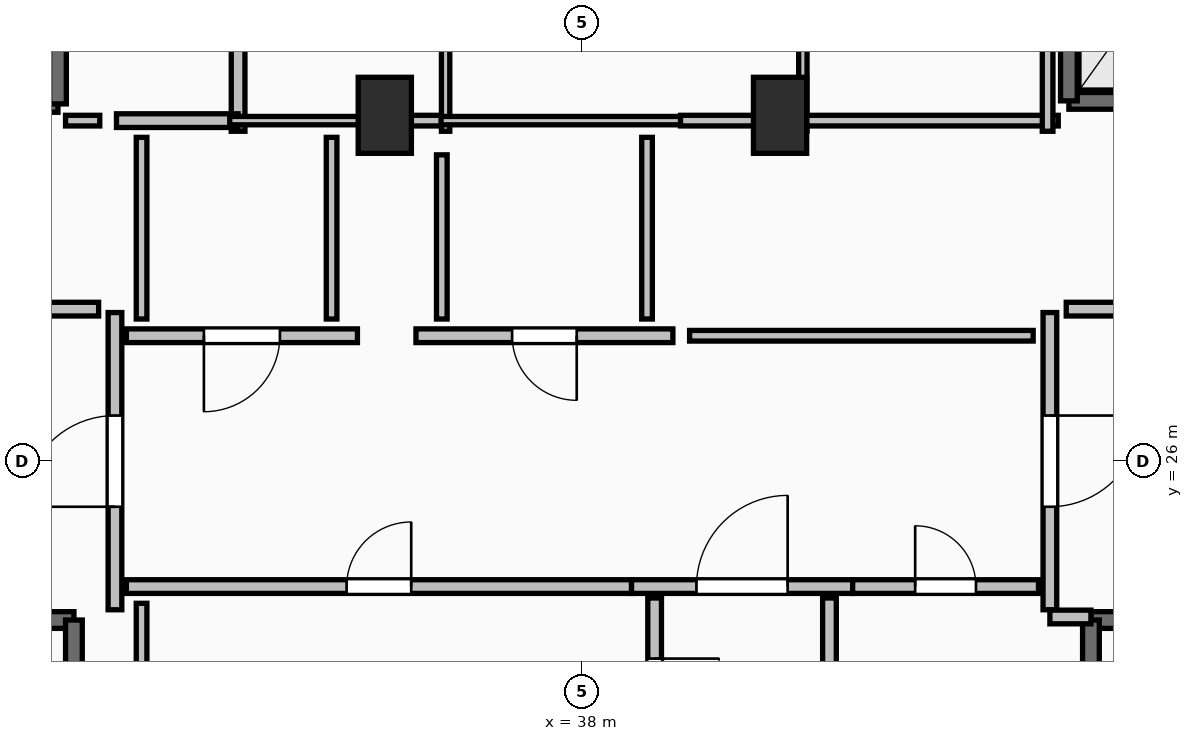
"""IFC4 building model, lengths in metres.
Left out: names, types, materials, properties, quantities, classifications, styles, units other than length and angle.
Written with IfcOpenShell. Run it as: python <this file> out.ifc"""

import sys

from ifc_helpers import new_model, si_unit, direction, frame, frame_2d, origin, origin_2d, place, context, subcontext, project, spatial, rectangle, extrude, element, fill, save


model = new_model("IFC4")
c1 = context("Model", 3, precision=1e-05, world=origin(), true_north=direction((0.0, 1.0)))
c2 = subcontext(c1, "Body", "Model", "MODEL_VIEW")
j1 = project(units=[si_unit("LENGTHUNIT", "METRE"), si_unit("PLANEANGLEUNIT", "RADIAN")], contexts=[c1])
p1 = place(None, origin())
s1 = spatial("IfcSite", under=j1, at=p1, CompositionType="ELEMENT")
p2 = place(p1, origin())
s2 = spatial("IfcBuilding", under=s1, at=p2, CompositionType="ELEMENT")
p3 = place(p2, frame((0.0, 0.0, 290.4)))
s3 = spatial("IfcBuildingStorey", under=s2, at=p3, CompositionType="ELEMENT", Elevation=290.4)
for number, where, z_axis, x_axis in (
    (1, (35.4, 30.55, 0.0), (0.0, 0.0, 1.0), (1.0, 0.0, 0.0)),
    (2, (40.6, 30.55, 0.0), (0.0, 0.0, 1.0), (1.0, 0.0, 0.0)),
):
    element("IfcColumn", number, at=place(p3, frame(where, z_axis=z_axis, x_axis=x_axis)), inside=s3, PredefinedType="PILASTER", context=c2, shape_type="SweptSolid", body=[
        extrude(rectangle(XDim=0.7, YDim=1.0, at=origin_2d()), origin(), (0.0, 0.0, 1.0), 5.0),
    ])
p4 = place(p3, frame((27.94, 23.91, 0.0), z_axis=(0.0, 0.0, 1.0), x_axis=(1.0, 0.0, 0.0)))
e3 = element("IfcWall", 3, at=p4, inside=s3, PredefinedType="SOLIDWALL", context=c2, shape_type="SweptSolid", body=[
    extrude(rectangle(XDim=3.37, YDim=0.22, at=frame_2d((1.685, 0.0))), origin(), (0.0, 0.0, 1.0), 4.72),
])
p5 = place(p4, frame((1.135, 0.0, 0.0)))
e4 = element("IfcOpeningElement", 4, at=p5, cuts=e3, PredefinedType="OPENING", context=c2, shape_type="SweptSolid", body=[
    extrude(rectangle(XDim=1.1, YDim=2.15, at=frame_2d((0.55, 1.075))), frame((0.0, 0.125, 0.0), z_axis=(0.0, -1.0, 0.0), x_axis=(1.0, 0.0, 0.0)), (0.0, 0.0, 1.0), 0.25),
])
p6 = place(p3, frame((31.31, 23.91, 0.0), z_axis=(0.0, 0.0, 1.0), x_axis=(0.0, -1.0, 0.0)))
e5 = element("IfcWall", 5, at=p6, inside=s3, PredefinedType="SOLIDWALL", context=c2, shape_type="SweptSolid", body=[
    extrude(rectangle(XDim=7.42, YDim=0.22, at=frame_2d((3.71, 0.0))), origin(), (0.0, 0.0, 1.0), 4.72),
])
p7 = place(p3, frame((44.69, 23.91, 0.0), z_axis=(0.0, 0.0, 1.0), x_axis=(1.0, 0.0, 0.0)))
e6 = element("IfcWall", 6, at=p7, inside=s3, PredefinedType="SOLIDWALL", context=c2, shape_type="SweptSolid", body=[
    extrude(rectangle(XDim=3.37, YDim=0.22, at=frame_2d((1.685, 0.0))), origin(), (0.0, 0.0, 1.0), 4.72),
])
p8 = place(p7, frame((1.135, 0.0, 0.0)))
e7 = element("IfcOpeningElement", 7, at=p8, cuts=e6, PredefinedType="OPENING", context=c2, shape_type="SweptSolid", body=[
    extrude(rectangle(XDim=1.1, YDim=2.15, at=frame_2d((0.55, 1.075))), frame((0.0, 0.125, 0.0), z_axis=(0.0, -1.0, 0.0), x_axis=(1.0, 0.0, 0.0)), (0.0, 0.0, 1.0), 0.25),
])
p9 = place(p3, frame((44.69, 16.49, 0.0), z_axis=(0.0, 0.0, 1.0), x_axis=(0.0, 1.0, 0.0)))
e8 = element("IfcWall", 8, at=p9, inside=s3, PredefinedType="SOLIDWALL", context=c2, shape_type="SweptSolid", body=[
    extrude(rectangle(XDim=7.42, YDim=0.22, at=frame_2d((3.71, 0.0))), origin(), (0.0, 0.0, 1.0), 4.72),
])
p10 = place(p3, frame((44.4, 30.74, 0.0), z_axis=(0.0, 0.0, 1.0), x_axis=(1.0, 0.0, 0.0)))
e9 = element("IfcWall", 9, at=p10, inside=s3, PredefinedType="SOLIDWALL", context=c2, shape_type="SweptSolid", body=[
    extrude(rectangle(XDim=1.8, YDim=0.22, at=frame_2d((0.9, 0.0))), origin(), (0.0, 0.0, 1.0), 4.72),
])
p11 = place(p3, frame((44.4, 33.16, 0.0), z_axis=(0.0, 0.0, 1.0), x_axis=(0.0, -1.0, 0.0)))
e10 = element("IfcWall", 10, at=p11, inside=s3, PredefinedType="SOLIDWALL", context=c2, shape_type="SweptSolid", body=[
    extrude(rectangle(XDim=2.42, YDim=0.22, at=frame_2d((1.21, 0.0))), origin(), (0.0, 0.0, 1.0), 4.72),
])
p12 = place(p3, frame((28.1, 30.7, 0.0), z_axis=(0.0, 0.0, 1.0), x_axis=(1.0, 0.0, 0.0)))
e11 = element("IfcWall", 11, at=p12, inside=s3, PredefinedType="SOLIDWALL", context=c2, shape_type="SweptSolid", body=[
    extrude(rectangle(XDim=3.0, YDim=0.22, at=frame_2d((1.5, 0.0))), origin(), (0.0, 0.0, 1.0), 4.72),
])
p13 = place(p3, frame((31.1, 30.7, 0.0), z_axis=(0.0, 0.0, 1.0), x_axis=(0.0, 1.0, 0.0)))
e12 = element("IfcWall", 12, at=p13, inside=s3, PredefinedType="SOLIDWALL", context=c2, shape_type="SweptSolid", body=[
    extrude(rectangle(XDim=2.5, YDim=0.22, at=frame_2d((1.25, 0.0))), origin(), (0.0, 0.0, 1.0), 4.72),
])
p14 = place(p3, frame((31.85, 24.045, 0.0), z_axis=(0.0, 0.0, 1.0), x_axis=(0.0, 1.0, 0.0)))
e13 = element("IfcWall", 13, at=p14, inside=s3, PredefinedType="PARTITIONING", context=c2, shape_type="SweptSolid", body=[
    extrude(rectangle(XDim=3.91, YDim=0.18, at=frame_2d((1.955, 0.0))), origin(), (0.0, 0.0, 1.0), 4.72),
])
p15 = place(p14, frame((1.355, 0.0, 0.0)))
e14 = element("IfcOpeningElement", 14, at=p15, cuts=e13, PredefinedType="OPENING", context=c2, shape_type="SweptSolid", body=[
    extrude(rectangle(XDim=1.2, YDim=2.15, at=frame_2d((0.6, 1.075))), frame((0.0, 0.105, 0.0), z_axis=(0.0, -1.0, 0.0), x_axis=(1.0, 0.0, 0.0)), (0.0, 0.0, 1.0), 0.21),
])
p16 = place(p3, frame((44.15, 27.955, 0.0), z_axis=(0.0, 0.0, 1.0), x_axis=(0.0, -1.0, 0.0)))
e15 = element("IfcWall", 15, at=p16, inside=s3, PredefinedType="PARTITIONING", context=c2, shape_type="SweptSolid", body=[
    extrude(rectangle(XDim=3.91, YDim=0.18, at=frame_2d((1.955, 0.0))), origin(), (0.0, 0.0, 1.0), 4.72),
])
p17 = place(p16, frame((1.355, 0.0, 0.0)))
e16 = element("IfcOpeningElement", 16, at=p17, cuts=e15, PredefinedType="OPENING", context=c2, shape_type="SweptSolid", body=[
    extrude(rectangle(XDim=1.2, YDim=2.15, at=frame_2d((0.6, 1.075))), frame((0.0, 0.105, 0.0), z_axis=(0.0, -1.0, 0.0), x_axis=(1.0, 0.0, 0.0)), (0.0, 0.0, 1.0), 0.21),
])
p18 = place(p3, frame((44.15, 23.95, 0.0), z_axis=(0.0, 0.0, 1.0), x_axis=(1.0, 0.0, 0.0)))
e17 = element("IfcWall", 17, at=p18, inside=s3, PredefinedType="PARTITIONING", context=c2, shape_type="SweptSolid", body=[
    extrude(rectangle(XDim=0.54, YDim=0.18, at=frame_2d((0.27, 0.0))), origin(), (0.0, 0.0, 1.0), 4.72),
])
p19 = place(p3, frame((33.47, 30.34, 0.0), z_axis=(0.0, 0.0, 1.0), x_axis=(0.0, 1.0, 0.0)))
e18 = element("IfcWall", 18, at=p19, inside=s3, PredefinedType="PARTITIONING", context=c2, shape_type="SweptSolid", body=[
    extrude(rectangle(XDim=3.56, YDim=0.18, at=frame_2d((1.78, 0.0))), origin(), (0.0, 0.0, 1.0), 4.72),
])
p20 = place(p3, frame((31.87, 30.48, 0.0), z_axis=(0.0, 0.0, 1.0), x_axis=(1.0, 0.0, 0.0)))
e19 = element("IfcWall", 19, at=p20, inside=s3, PredefinedType="PARTITIONING", context=c2, shape_type="SweptSolid", body=[
    extrude(rectangle(XDim=1.6, YDim=0.18, at=frame_2d((0.8, 0.0))), origin(), (0.0, 0.0, 1.0), 4.72),
])
p21 = place(p3, frame((38.645, 24.35, 0.0), z_axis=(0.0, 0.0, 1.0), x_axis=(1.0, 0.0, 0.0)))
e20 = element("IfcWall", 20, at=p21, inside=s3, PredefinedType="PARTITIONING", context=c2, shape_type="SweptSolid", body=[
    extrude(rectangle(XDim=2.91, YDim=0.18, at=frame_2d((1.455, 0.0))), origin(), (0.0, 0.0, 1.0), 4.72),
])
p22 = place(p21, frame((0.855, 0.0, 0.0)))
e21 = element("IfcOpeningElement", 21, at=p22, cuts=e20, PredefinedType="OPENING", context=c2, shape_type="SweptSolid", body=[
    extrude(rectangle(XDim=1.2, YDim=2.15, at=frame_2d((0.6, 1.075))), frame((0.0, 0.105, 0.0), z_axis=(0.0, -1.0, 0.0), x_axis=(1.0, 0.0, 0.0)), (0.0, 0.0, 1.0), 0.21),
])
p23 = place(p3, frame((41.555, 24.35, 0.0), z_axis=(0.0, 0.0, 1.0), x_axis=(1.0, 0.0, 0.0)))
e22 = element("IfcWall", 22, at=p23, inside=s3, PredefinedType="PARTITIONING", context=c2, shape_type="SweptSolid", body=[
    extrude(rectangle(XDim=2.445, YDim=0.18, at=frame_2d((1.223, 0.0))), origin(), (0.0, 0.0, 1.0), 4.72),
])
p24 = place(p23, frame((0.823, 0.0, 0.0)))
e23 = element("IfcOpeningElement", 23, at=p24, cuts=e22, PredefinedType="OPENING", context=c2, shape_type="SweptSolid", body=[
    extrude(rectangle(XDim=0.8, YDim=2.05, at=frame_2d((0.4, 1.025))), frame((0.0, 0.105, 0.0), z_axis=(0.0, -1.0, 0.0), x_axis=(1.0, 0.0, 0.0)), (0.0, 0.0, 1.0), 0.21),
])
p25 = place(p3, frame((35.04, 27.65, 0.0), z_axis=(0.0, 0.0, 1.0), x_axis=(-1.0, 0.0, 0.0)))
e24 = element("IfcWall", 24, at=p25, inside=s3, PredefinedType="PARTITIONING", context=c2, shape_type="SweptSolid", body=[
    extrude(rectangle(XDim=3.04, YDim=0.18, at=frame_2d((1.52, 0.0))), origin(), (0.0, 0.0, 1.0), 4.72),
])
p26 = place(p25, frame((1.02, 0.0, 0.0)))
e25 = element("IfcOpeningElement", 25, at=p26, cuts=e24, PredefinedType="OPENING", context=c2, shape_type="SweptSolid", body=[
    extrude(rectangle(XDim=1.0, YDim=2.15, at=frame_2d((0.5, 1.075))), frame((0.0, 0.105, 0.0), z_axis=(0.0, -1.0, 0.0), x_axis=(1.0, 0.0, 0.0)), (0.0, 0.0, 1.0), 0.21),
])
p27 = place(p3, frame((39.19, 27.65, 0.0), z_axis=(0.0, 0.0, 1.0), x_axis=(-1.0, 0.0, 0.0)))
e26 = element("IfcWall", 26, at=p27, inside=s3, PredefinedType="PARTITIONING", context=c2, shape_type="SweptSolid", body=[
    extrude(rectangle(XDim=3.38, YDim=0.18, at=frame_2d((1.69, 0.0))), origin(), (0.0, 0.0, 1.0), 4.72),
])
p28 = place(p27, frame((1.265, 0.0, 0.0)))
e27 = element("IfcOpeningElement", 27, at=p28, cuts=e26, PredefinedType="OPENING", context=c2, shape_type="SweptSolid", body=[
    extrude(rectangle(XDim=0.85, YDim=2.1, at=frame_2d((0.425, 1.05))), frame((0.0, 0.105, 0.0), z_axis=(0.0, -1.0, 0.0), x_axis=(1.0, 0.0, 0.0)), (0.0, 0.0, 1.0), 0.21),
])
p29 = place(p3, frame((32.0, 24.35, 0.0), z_axis=(0.0, 0.0, 1.0), x_axis=(1.0, 0.0, 0.0)))
e28 = element("IfcWall", 28, at=p29, inside=s3, PredefinedType="PARTITIONING", context=c2, shape_type="SweptSolid", body=[
    extrude(rectangle(XDim=6.645, YDim=0.18, at=frame_2d((3.323, 0.0))), origin(), (0.0, 0.0, 1.0), 4.72),
])
p30 = place(p29, frame((2.897, 0.0, 0.0)))
e29 = element("IfcOpeningElement", 29, at=p30, cuts=e28, PredefinedType="OPENING", context=c2, shape_type="SweptSolid", body=[
    extrude(rectangle(XDim=0.85, YDim=2.1, at=frame_2d((0.425, 1.05))), frame((0.0, 0.105, 0.0), z_axis=(0.0, -1.0, 0.0), x_axis=(1.0, 0.0, 0.0)), (0.0, 0.0, 1.0), 0.21),
])
p31 = place(p3, frame((41.25, 16.32, 0.0), z_axis=(0.0, 0.0, 1.0), x_axis=(0.0, 1.0, 0.0)))
e30 = element("IfcWall", 30, at=p31, inside=s3, PredefinedType="PARTITIONING", context=c2, shape_type="SweptSolid", body=[
    extrude(rectangle(XDim=7.88, YDim=0.18, at=frame_2d((3.94, 0.0))), origin(), (0.0, 0.0, 1.0), 3.912),
])
p32 = place(p31, frame((3.54, 0.0, 0.0)))
e31 = element("IfcOpeningElement", 31, at=p32, cuts=e30, PredefinedType="OPENING", context=c2, shape_type="SweptSolid", body=[
    extrude(rectangle(XDim=0.8, YDim=2.05, at=frame_2d((0.4, 1.025))), frame((0.0, 0.105, 0.0), z_axis=(0.0, -1.0, 0.0), x_axis=(1.0, 0.0, 0.0)), (0.0, 0.0, 1.0), 0.21),
])
p33 = place(p3, frame((38.95, 24.2, 0.0), z_axis=(0.0, 0.0, 1.0), x_axis=(0.0, -1.0, 0.0)))
e32 = element("IfcWall", 32, at=p33, inside=s3, PredefinedType="PARTITIONING", context=c2, shape_type="SweptSolid", body=[
    extrude(rectangle(XDim=2.445, YDim=0.18, at=frame_2d((1.223, 0.0))), origin(), (0.0, 0.0, 1.0), 3.912),
])
p34 = place(p33, frame((0.798, 0.0, 0.0)))
e33 = element("IfcOpeningElement", 33, at=p34, cuts=e32, PredefinedType="OPENING", context=c2, shape_type="SweptSolid", body=[
    extrude(rectangle(XDim=0.85, YDim=2.1, at=frame_2d((0.425, 1.05))), frame((0.0, 0.105, 0.0), z_axis=(0.0, -1.0, 0.0), x_axis=(1.0, 0.0, 0.0)), (0.0, 0.0, 1.0), 0.21),
])
p35 = place(p3, frame((36.2, 30.34, 0.0), z_axis=(0.0, 0.0, 1.0), x_axis=(0.0, 1.0, 0.0)))
e34 = element("IfcWall", 34, at=p35, inside=s3, PredefinedType="PARTITIONING", context=c2, shape_type="SweptSolid", body=[
    extrude(rectangle(XDim=3.56, YDim=0.11, at=frame_2d((1.78, 0.0))), origin(), (0.0, 0.0, 1.0), 3.912),
])
p36 = place(p3, frame((33.36, 30.48, 0.0), z_axis=(0.0, 0.0, 1.0), x_axis=(1.0, 0.0, 0.0)))
e35 = element("IfcWall", 35, at=p36, inside=s3, PredefinedType="PARTITIONING", context=c2, shape_type="SweptSolid", body=[
    extrude(rectangle(XDim=1.81, YDim=0.11, at=frame_2d((0.905, 0.0))), origin(), (0.0, 0.0, 1.0), 4.72),
])
p37 = place(p3, frame((40.9, 30.34, 0.0), z_axis=(0.0, 0.0, 1.0), x_axis=(0.0, 1.0, 0.0)))
e36 = element("IfcWall", 36, at=p37, inside=s3, PredefinedType="PARTITIONING", context=c2, shape_type="SweptSolid", body=[
    extrude(rectangle(XDim=3.56, YDim=0.11, at=frame_2d((1.78, 0.0))), origin(), (0.0, 0.0, 1.0), 4.72),
])
p38 = place(p3, frame((36.11, 30.48, 0.0), z_axis=(0.0, 0.0, 1.0), x_axis=(1.0, 0.0, 0.0)))
e37 = element("IfcWall", 37, at=p38, inside=s3, PredefinedType="PARTITIONING", context=c2, shape_type="SweptSolid", body=[
    extrude(rectangle(XDim=3.21, YDim=0.11, at=frame_2d((1.605, 0.0))), origin(), (0.0, 0.0, 1.0), 3.912),
])
for number, where, z_axis, x_axis in (
    (38, (31.635, 28.0, 0.0), (0.0, 0.0, 1.0), (-1.0, 0.0, 0.0)),
    (39, (45.28, 28.0, 0.0), (0.0, 0.0, 1.0), (-1.0, 0.0, 0.0)),
):
    element("IfcWall", number, at=place(p3, frame(where, z_axis=z_axis, x_axis=x_axis)), inside=s3, PredefinedType="PARTITIONING", context=c2, shape_type="SweptSolid", body=[
        extrude(rectangle(XDim=0.915, YDim=0.18, at=frame_2d((0.458, 0.0))), origin(), (0.0, 0.0, 1.0), 4.72),
    ])
p39 = place(p3, frame((31.2, 30.48, 0.0), z_axis=(0.0, 0.0, 1.0), x_axis=(1.0, 0.0, 0.0)))
e40 = element("IfcWall", 40, at=p39, inside=s3, PredefinedType="PARTITIONING", context=c2, shape_type="SweptSolid", body=[
    extrude(rectangle(XDim=0.45, YDim=0.14, at=frame_2d((0.225, 0.0))), origin(), (0.0, 0.0, 1.0), 4.72),
])
p40 = place(p3, frame((43.93, 27.65, 0.0), z_axis=(0.0, 0.0, 1.0), x_axis=(-1.0, 0.0, 0.0)))
e41 = element("IfcWall", 41, at=p40, inside=s3, PredefinedType="PARTITIONING", context=c2, shape_type="SweptSolid", body=[
    extrude(rectangle(XDim=4.52, YDim=0.14, at=frame_2d((2.26, 0.0))), origin(), (0.0, 0.0, 1.0), 4.72),
])
p41 = place(p3, frame((35.14, 30.48, 0.0), z_axis=(0.0, 0.0, 1.0), x_axis=(1.0, 0.0, 0.0)))
e42 = element("IfcWall", 42, at=p41, inside=s3, PredefinedType="PARTITIONING", context=c2, shape_type="SweptSolid", body=[
    extrude(rectangle(XDim=1.0, YDim=0.14, at=frame_2d((0.5, 0.0))), origin(), (0.0, 0.0, 1.0), 3.912),
])
p42 = place(p3, frame((39.29, 30.48, 0.0), z_axis=(0.0, 0.0, 1.0), x_axis=(1.0, 0.0, 0.0)))
e43 = element("IfcWall", 43, at=p42, inside=s3, PredefinedType="PARTITIONING", context=c2, shape_type="SweptSolid", body=[
    extrude(rectangle(XDim=1.64, YDim=0.14, at=frame_2d((0.82, 0.0))), origin(), (0.0, 0.0, 1.0), 3.912),
])
p43 = place(p3, frame((40.95, 30.48, 0.0), z_axis=(0.0, 0.0, 1.0), x_axis=(1.0, 0.0, 0.0)))
e44 = element("IfcWall", 44, at=p43, inside=s3, PredefinedType="PARTITIONING", context=c2, shape_type="SweptSolid", body=[
    extrude(rectangle(XDim=3.31, YDim=0.14, at=frame_2d((1.655, 0.0))), origin(), (0.0, 0.0, 1.0), 4.72),
])
p44 = place(p3, frame((44.12, 30.34, 0.0), z_axis=(0.0, 0.0, 1.0), x_axis=(0.0, 1.0, 0.0)))
e45 = element("IfcWall", 45, at=p44, inside=s3, PredefinedType="PARTITIONING", context=c2, shape_type="SweptSolid", body=[
    extrude(rectangle(XDim=2.66, YDim=0.14, at=frame_2d((1.33, 0.0))), origin(), (0.0, 0.0, 1.0), 4.72),
])
for number, where, z_axis, x_axis in (
    (46, (32.2, 30.26, 0.0), (0.0, 0.0, 1.0), (0.0, -1.0, 0.0)),
    (47, (34.7, 27.87, 0.0), (0.0, 0.0, 1.0), (0.0, 1.0, 0.0)),
):
    element("IfcWall", number, at=place(p3, frame(where, z_axis=z_axis, x_axis=x_axis)), inside=s3, PredefinedType="PARTITIONING", context=c2, shape_type="SweptSolid", body=[
        extrude(rectangle(XDim=2.39, YDim=0.14, at=frame_2d((1.195, 0.0))), origin(), (0.0, 0.0, 1.0), 4.72),
    ])
p45 = place(p3, frame((36.15, 30.03, 0.0), z_axis=(0.0, 0.0, 1.0), x_axis=(0.0, -1.0, 0.0)))
e48 = element("IfcWall", 48, at=p45, inside=s3, PredefinedType="PARTITIONING", context=c2, shape_type="SweptSolid", body=[
    extrude(rectangle(XDim=2.16, YDim=0.14, at=frame_2d((1.08, 0.0))), origin(), (0.0, 0.0, 1.0), 4.72),
])
p46 = place(p3, frame((38.85, 27.87, 0.0), z_axis=(0.0, 0.0, 1.0), x_axis=(0.0, 1.0, 0.0)))
e49 = element("IfcWall", 49, at=p46, inside=s3, PredefinedType="PARTITIONING", context=c2, shape_type="SweptSolid", body=[
    extrude(rectangle(XDim=2.39, YDim=0.14, at=frame_2d((1.195, 0.0))), origin(), (0.0, 0.0, 1.0), 4.72),
])
p47 = place(p3, frame((32.2, 24.13, 0.0), z_axis=(0.0, 0.0, 1.0), x_axis=(0.0, -1.0, 0.0)))
e50 = element("IfcWall", 50, at=p47, inside=s3, PredefinedType="PARTITIONING", context=c2, shape_type="SweptSolid", body=[
    extrude(rectangle(XDim=2.46, YDim=0.14, at=frame_2d((1.23, 0.0))), origin(), (0.0, 0.0, 1.0), 3.912),
])
p48 = place(p15, origin())
e51 = element("IfcDoor", 51, at=p48, inside=s3, OperationType="SINGLE_SWING_LEFT", PredefinedType="DOOR", context=c2, shape_type="SweptSolid", body=[
    extrude(rectangle(XDim=1.2, YDim=2.15, at=frame_2d((0.6, 1.075))), frame((0.0, 0.025, 0.0), z_axis=(0.0, -1.0, 0.0), x_axis=(1.0, 0.0, 0.0)), (0.0, 0.0, 1.0), 0.05),
])
fill(e14, e51)
p49 = place(p17, origin())
e52 = element("IfcDoor", 52, at=p49, inside=s3, OperationType="SINGLE_SWING_LEFT", PredefinedType="DOOR", context=c2, shape_type="SweptSolid", body=[
    extrude(rectangle(XDim=1.2, YDim=2.15, at=frame_2d((0.6, 1.075))), frame((0.0, 0.025, 0.0), z_axis=(0.0, -1.0, 0.0), x_axis=(1.0, 0.0, 0.0)), (0.0, 0.0, 1.0), 0.05),
])
fill(e16, e52)
p50 = place(p22, origin())
e53 = element("IfcDoor", 53, at=p50, inside=s3, OperationType="SINGLE_SWING_RIGHT", PredefinedType="DOOR", context=c2, shape_type="SweptSolid", body=[
    extrude(rectangle(XDim=1.2, YDim=2.15, at=frame_2d((0.6, 1.075))), frame((0.0, 0.025, 0.0), z_axis=(0.0, -1.0, 0.0), x_axis=(1.0, 0.0, 0.0)), (0.0, 0.0, 1.0), 0.05),
])
fill(e21, e53)
p51 = place(p24, origin())
e54 = element("IfcDoor", 54, at=p51, inside=s3, OperationType="SINGLE_SWING_LEFT", PredefinedType="DOOR", context=c2, shape_type="SweptSolid", body=[
    extrude(rectangle(XDim=0.8, YDim=2.05, at=frame_2d((0.4, 1.025))), frame((0.0, 0.025, 0.0), z_axis=(0.0, -1.0, 0.0), x_axis=(1.0, 0.0, 0.0)), (0.0, 0.0, 1.0), 0.05),
])
fill(e23, e54)
p52 = place(p26, origin())
e55 = element("IfcDoor", 55, at=p52, inside=s3, OperationType="SINGLE_SWING_RIGHT", PredefinedType="DOOR", context=c2, shape_type="SweptSolid", body=[
    extrude(rectangle(XDim=1.0, YDim=2.15, at=frame_2d((0.5, 1.075))), frame((0.0, 0.025, 0.0), z_axis=(0.0, -1.0, 0.0), x_axis=(1.0, 0.0, 0.0)), (0.0, 0.0, 1.0), 0.05),
])
fill(e25, e55)
p53 = place(p28, origin())
e56 = element("IfcDoor", 56, at=p53, inside=s3, OperationType="SINGLE_SWING_LEFT", PredefinedType="DOOR", context=c2, shape_type="SweptSolid", body=[
    extrude(rectangle(XDim=0.85, YDim=2.1, at=frame_2d((0.425, 1.05))), frame((0.0, 0.025, 0.0), z_axis=(0.0, -1.0, 0.0), x_axis=(1.0, 0.0, 0.0)), (0.0, 0.0, 1.0), 0.05),
])
fill(e27, e56)
p54 = place(p30, origin())
e57 = element("IfcDoor", 57, at=p54, inside=s3, OperationType="SINGLE_SWING_RIGHT", PredefinedType="DOOR", context=c2, shape_type="SweptSolid", body=[
    extrude(rectangle(XDim=0.85, YDim=2.1, at=frame_2d((0.425, 1.05))), frame((0.0, 0.025, 0.0), z_axis=(0.0, -1.0, 0.0), x_axis=(1.0, 0.0, 0.0)), (0.0, 0.0, 1.0), 0.05),
])
fill(e29, e57)
p55 = place(p34, origin())
e58 = element("IfcDoor", 58, at=p55, inside=s3, OperationType="SINGLE_SWING_LEFT", PredefinedType="DOOR", context=c2, shape_type="SweptSolid", body=[
    extrude(rectangle(XDim=0.85, YDim=2.1, at=frame_2d((0.425, 1.05))), frame((0.0, 0.025, 0.0), z_axis=(0.0, -1.0, 0.0), x_axis=(1.0, 0.0, 0.0)), (0.0, 0.0, 1.0), 0.05),
])
fill(e33, e58)
save(model, sys.argv[1])
